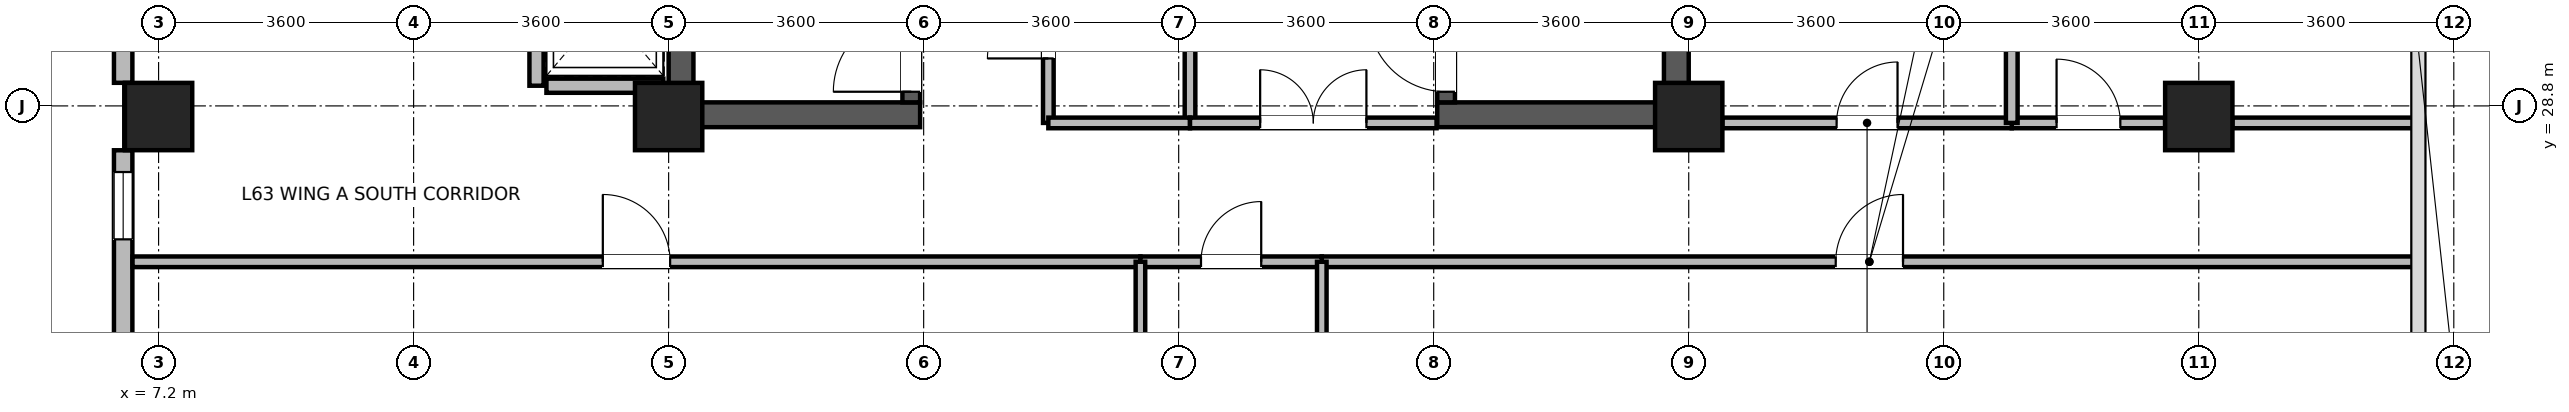
"""IFC4 building model, lengths in metres.
Left out: names, types, materials, properties, quantities, classifications, styles, units other than length and angle.
Written with IfcOpenShell. Run it as: python <this file> out.ifc"""

import sys

from ifc_helpers import new_model, si_unit, direction, frame, frame_2d, origin, origin_2d, place, context, subcontext, project, spatial, rectangle, extrude, source, transform, mapped, element, fill, save


model = new_model("IFC4")
c1 = context("Model", 3, precision=1e-05, world=origin(), true_north=direction((0.0, 1.0)))
c2 = subcontext(c1, "Body", "Model", "MODEL_VIEW")
j1 = project(units=[si_unit("LENGTHUNIT", "METRE"), si_unit("PLANEANGLEUNIT", "RADIAN")], contexts=[c1])
p1 = place(None, origin())
s1 = spatial("IfcSite", under=j1, at=p1, CompositionType="ELEMENT")
p2 = place(p1, origin())
s2 = spatial("IfcBuilding", under=s1, at=p2, CompositionType="ELEMENT")
p3 = place(p2, frame((0.0, 0.0, 246.2)))
s3 = spatial("IfcBuildingStorey", under=s2, at=p3, CompositionType="ELEMENT", Elevation=246.2)
for number, where, z_axis, x_axis in (
    (1, (14.575, 28.5, 0.0), (0.0, 0.0, 1.0), (0.0, 1.0, 0.0)),
    (2, (28.625, 28.5, 0.0), (0.0, 0.0, 1.0), (0.0, 1.0, 0.0)),
):
    element("IfcWall", number, at=place(p3, frame(where, z_axis=z_axis, x_axis=x_axis)), inside=s3, PredefinedType="SHEAR", context=c2, shape_type="SweptSolid", body=[
        extrude(rectangle(XDim=7.7, YDim=0.35, at=frame_2d((3.85, 0.0))), origin(), (0.0, 0.0, 1.0), 3.28),
    ])
for number, where, z_axis, x_axis in (
    (3, (14.75, 28.675, 0.0), (0.0, 0.0, 1.0), (1.0, 0.0, 0.0)),
    (4, (25.25, 28.675, 0.0), (0.0, 0.0, 1.0), (1.0, 0.0, 0.0)),
):
    element("IfcWall", number, at=place(p3, frame(where, z_axis=z_axis, x_axis=x_axis)), inside=s3, PredefinedType="SHEAR", context=c2, shape_type="SweptSolid", body=[
        extrude(rectangle(XDim=3.2, YDim=0.35, at=frame_2d((1.6, 0.0))), origin(), (0.0, 0.0, 1.0), 3.28),
    ])
p4 = place(p3, frame((17.825, 28.85, 0.0), z_axis=(0.0, 0.0, 1.0), x_axis=(0.0, 1.0, 0.0)))
e5 = element("IfcWall", 5, at=p4, inside=s3, PredefinedType="SHEAR", context=c2, shape_type="SweptSolid", body=[
    extrude(rectangle(XDim=7.0, YDim=0.25, at=frame_2d((3.5, 0.0))), origin(), (0.0, 0.0, 1.0), 3.28),
])
p5 = place(p4, frame((0.15, 0.0, 0.0)))
e6 = element("IfcOpeningElement", 6, at=p5, cuts=e5, PredefinedType="OPENING", context=c2, shape_type="SweptSolid", body=[
    extrude(rectangle(XDim=1.1, YDim=2.08, at=frame_2d((0.55, 1.04))), frame((0.0, 0.135, 0.0), z_axis=(0.0, -1.0, 0.0), x_axis=(1.0, 0.0, 0.0)), (0.0, 0.0, 1.0), 0.27),
])
p6 = place(p3, frame((25.375, 28.85, 0.0), z_axis=(0.0, 0.0, 1.0), x_axis=(0.0, 1.0, 0.0)))
e7 = element("IfcWall", 7, at=p6, inside=s3, PredefinedType="SHEAR", context=c2, shape_type="SweptSolid", body=[
    extrude(rectangle(XDim=7.0, YDim=0.25, at=frame_2d((3.5, 0.0))), origin(), (0.0, 0.0, 1.0), 3.28),
])
p7 = place(p6, frame((0.15, 0.0, 0.0)))
e8 = element("IfcOpeningElement", 8, at=p7, cuts=e7, PredefinedType="OPENING", context=c2, shape_type="SweptSolid", body=[
    extrude(rectangle(XDim=1.1, YDim=2.08, at=frame_2d((0.55, 1.04))), frame((0.0, 0.135, 0.0), z_axis=(0.0, -1.0, 0.0), x_axis=(1.0, 0.0, 0.0)), (0.0, 0.0, 1.0), 0.27),
])
m1 = source(origin(), c2, "Body", "SweptSolid", [
    extrude(rectangle(XDim=0.95, YDim=0.95, at=origin_2d()), origin(), (0.0, 0.0, 1.0), 3.7),
])
for number, where, z_axis, x_axis in (
    (9, (7.2, 28.65, 0.0), (0.0, 0.0, 1.0), (1.0, 0.0, 0.0)),
    (10, (14.4, 28.65, 0.0), (0.0, 0.0, 1.0), (1.0, 0.0, 0.0)),
    (11, (28.8, 28.65, 0.0), (0.0, 0.0, 1.0), (1.0, 0.0, 0.0)),
    (12, (36.0, 28.65, 0.0), (0.0, 0.0, 1.0), (1.0, 0.0, 0.0)),
):
    element("IfcColumn", number, at=place(p3, frame(where, z_axis=z_axis, x_axis=x_axis)), inside=s3, PredefinedType="COLUMN", context=c2, shape_type="MappedRepresentation", body=[
        mapped(m1, transform((0.0, 0.0, 0.0), x_axis=(1.0, 0.0, 0.0), y_axis=(0.0, 1.0, 0.0), z_axis=(0.0, 0.0, 1.0), scale=1.0)),
    ])
p8 = place(p3, frame((6.7, 29.126, 0.0), z_axis=(0.0, 0.0, 1.0), x_axis=(0.0, 1.0, 0.0)))
e13 = element("IfcWall", 13, at=p8, inside=s3, PredefinedType="STANDARD", context=c2, shape_type="SweptSolid", body=[
    extrude(rectangle(XDim=6.548, YDim=0.26, at=frame_2d((3.274, 0.0))), origin(), (0.0, 0.0, 1.0), 3.26),
])
p9 = place(p8, frame((1.037, 0.0, 0.85)))
e14 = element("IfcOpeningElement", 14, at=p9, cuts=e13, PredefinedType="OPENING", context=c2, shape_type="SweptSolid", body=[
    extrude(rectangle(XDim=1.2, YDim=1.75, at=frame_2d((0.6, 0.875))), frame((0.0, 0.14, 0.0), z_axis=(0.0, -1.0, 0.0), x_axis=(1.0, 0.0, 0.0)), (0.0, 0.0, 1.0), 0.28),
])
p10 = place(p8, frame((4.311, 0.0, 0.85)))
e15 = element("IfcOpeningElement", 15, at=p10, cuts=e13, PredefinedType="OPENING", context=c2, shape_type="SweptSolid", body=[
    extrude(rectangle(XDim=1.2, YDim=1.75, at=frame_2d((0.6, 0.875))), frame((0.0, 0.14, 0.0), z_axis=(0.0, -1.0, 0.0), x_axis=(1.0, 0.0, 0.0)), (0.0, 0.0, 1.0), 0.28),
])
p11 = place(p3, frame((6.7, 25.07, 0.0), z_axis=(0.0, 0.0, 1.0), x_axis=(0.0, 1.0, 0.0)))
e16 = element("IfcWall", 16, at=p11, inside=s3, PredefinedType="STANDARD", context=c2, shape_type="SweptSolid", body=[
    extrude(rectangle(XDim=3.104, YDim=0.26, at=frame_2d((1.552, 0.0))), origin(), (0.0, 0.0, 1.0), 3.26),
])
p12 = place(p11, frame((1.847, 0.0, 0.85)))
e17 = element("IfcOpeningElement", 17, at=p12, cuts=e16, PredefinedType="OPENING", context=c2, shape_type="SweptSolid", body=[
    extrude(rectangle(XDim=0.95, YDim=1.75, at=frame_2d((0.475, 0.875))), frame((0.0, 0.14, 0.0), z_axis=(0.0, -1.0, 0.0), x_axis=(1.0, 0.0, 0.0)), (0.0, 0.0, 1.0), 0.28),
])
p13 = place(p3, frame((12.675, 29.085, 0.0), z_axis=(0.0, 0.0, 1.0), x_axis=(1.0, 0.0, 0.0)))
e18 = element("IfcWall", 18, at=p13, inside=s3, PredefinedType="PARTITIONING", context=c2, shape_type="SweptSolid", body=[
    extrude(rectangle(XDim=1.65, YDim=0.2, at=frame_2d((0.825, 0.0))), origin(), (0.0, 0.0, 1.0), 1.46),
])
p14 = place(p3, frame((12.535, 29.085, 0.0), z_axis=(0.0, 0.0, 1.0), x_axis=(0.0, 1.0, 0.0)))
e19 = element("IfcWall", 19, at=p14, inside=s3, PredefinedType="PARTITIONING", context=c2, shape_type="SweptSolid", body=[
    extrude(rectangle(XDim=2.23, YDim=0.2, at=frame_2d((1.115, 0.0))), origin(), (0.0, 0.0, 1.0), 3.26),
])
p15 = place(p3, frame((23.62, 26.6, 0.0), z_axis=(0.0, 0.0, 1.0), x_axis=(1.0, 0.0, 0.0)))
e20 = element("IfcWall", 20, at=p15, inside=s3, PredefinedType="PARTITIONING", context=c2, shape_type="SweptSolid", body=[
    extrude(rectangle(XDim=15.46, YDim=0.15, at=frame_2d((7.73, 0.0))), origin(), (0.0, 0.0, 1.0), 3.26),
])
p16 = place(p15, frame((7.255, 0.0, 0.0)))
e21 = element("IfcOpeningElement", 21, at=p16, cuts=e20, PredefinedType="OPENING", context=c2, shape_type="SweptSolid", body=[
    extrude(rectangle(XDim=0.95, YDim=2.1, at=frame_2d((0.475, 1.05))), frame((0.0, 0.085, 0.0), z_axis=(0.0, -1.0, 0.0), x_axis=(1.0, 0.0, 0.0)), (0.0, 0.0, 1.0), 0.17),
])
p17 = place(p3, frame((6.832, 26.6, 0.0), z_axis=(0.0, 0.0, 1.0), x_axis=(1.0, 0.0, 0.0)))
e22 = element("IfcWall", 22, at=p17, inside=s3, PredefinedType="PARTITIONING", context=c2, shape_type="SweptSolid", body=[
    extrude(rectangle(XDim=14.228, YDim=0.15, at=frame_2d((7.114, 0.0))), origin(), (0.0, 0.0, 1.0), 3.26),
])
p18 = place(p17, frame((6.639, 0.0, 0.0)))
e23 = element("IfcOpeningElement", 23, at=p18, cuts=e22, PredefinedType="OPENING", context=c2, shape_type="SweptSolid", body=[
    extrude(rectangle(XDim=0.95, YDim=2.1, at=frame_2d((0.475, 1.05))), frame((0.0, 0.085, 0.0), z_axis=(0.0, -1.0, 0.0), x_axis=(1.0, 0.0, 0.0)), (0.0, 0.0, 1.0), 0.17),
])
p19 = place(p3, frame((33.36, 28.56, 0.0), z_axis=(0.0, 0.0, 1.0), x_axis=(1.0, 0.0, 0.0)))
e24 = element("IfcWall", 24, at=p19, inside=s3, PredefinedType="PARTITIONING", context=c2, shape_type="SweptSolid", body=[
    extrude(rectangle(XDim=2.165, YDim=0.15, at=frame_2d((1.083, 0.0))), origin(), (0.0, 0.0, 1.0), 2.71),
])
p20 = place(p19, frame((0.633, 0.0, 0.0)))
e25 = element("IfcOpeningElement", 25, at=p20, cuts=e24, PredefinedType="OPENING", context=c2, shape_type="SweptSolid", body=[
    extrude(rectangle(XDim=0.9, YDim=2.08, at=frame_2d((0.45, 1.04))), frame((0.0, 0.085, 0.0), z_axis=(0.0, -1.0, 0.0), x_axis=(1.0, 0.0, 0.0)), (0.0, 0.0, 1.0), 0.17),
])
p21 = place(p3, frame((36.475, 28.56, 0.0), z_axis=(0.0, 0.0, 1.0), x_axis=(1.0, 0.0, 0.0)))
e26 = element("IfcWall", 26, at=p21, inside=s3, PredefinedType="PARTITIONING", context=c2, shape_type="SweptSolid", body=[
    extrude(rectangle(XDim=2.605, YDim=0.15, at=frame_2d((1.302, 0.0))), origin(), (0.0, 0.0, 1.0), 2.46),
])
p22 = place(p3, frame((29.275, 28.56, 0.0), z_axis=(0.0, 0.0, 1.0), x_axis=(1.0, 0.0, 0.0)))
e27 = element("IfcWall", 27, at=p22, inside=s3, PredefinedType="PARTITIONING", context=c2, shape_type="SweptSolid", body=[
    extrude(rectangle(XDim=4.085, YDim=0.15, at=frame_2d((2.042, 0.0))), origin(), (0.0, 0.0, 1.0), 2.71),
])
p23 = place(p22, frame((1.613, 0.0, 0.0)))
e28 = element("IfcOpeningElement", 28, at=p23, cuts=e27, PredefinedType="OPENING", context=c2, shape_type="SweptSolid", body=[
    extrude(rectangle(XDim=0.86, YDim=2.02, at=frame_2d((0.43, 1.01))), frame((0.0, 0.085, 0.0), z_axis=(0.0, -1.0, 0.0), x_axis=(1.0, 0.0, 0.0)), (0.0, 0.0, 1.0), 0.17),
])
p24 = place(p3, frame((19.76, 28.56, 0.0), z_axis=(0.0, 0.0, 1.0), x_axis=(0.0, 1.0, 0.0)))
e29 = element("IfcWall", 29, at=p24, inside=s3, PredefinedType="PARTITIONING", context=c2, shape_type="SweptSolid", body=[
    extrude(rectangle(XDim=2.68, YDim=0.15, at=frame_2d((1.34, 0.0))), origin(), (0.0, 0.0, 1.0), 3.26),
])
p25 = place(p24, frame((0.91, 0.0, 0.0)))
e30 = element("IfcOpeningElement", 30, at=p25, cuts=e29, PredefinedType="OPENING", context=c2, shape_type="SweptSolid", body=[
    extrude(rectangle(XDim=0.86, YDim=2.02, at=frame_2d((0.43, 1.01))), frame((0.0, 0.085, 0.0), z_axis=(0.0, -1.0, 0.0), x_axis=(1.0, 0.0, 0.0)), (0.0, 0.0, 1.0), 0.17),
])
p26 = place(p3, frame((21.76, 28.56, 0.0), z_axis=(0.0, 0.0, 1.0), x_axis=(0.0, 1.0, 0.0)))
e31 = element("IfcWall", 31, at=p26, inside=s3, PredefinedType="PARTITIONING", context=c2, shape_type="SweptSolid", body=[
    extrude(rectangle(XDim=2.68, YDim=0.15, at=frame_2d((1.34, 0.0))), origin(), (0.0, 0.0, 1.0), 3.26),
])
p27 = place(p3, frame((21.06, 26.6, 0.0), z_axis=(0.0, 0.0, 1.0), x_axis=(1.0, 0.0, 0.0)))
e32 = element("IfcWall", 32, at=p27, inside=s3, PredefinedType="PARTITIONING", context=c2, shape_type="SweptSolid", body=[
    extrude(rectangle(XDim=2.56, YDim=0.15, at=frame_2d((1.28, 0.0))), origin(), (0.0, 0.0, 1.0), 3.26),
])
p28 = place(p27, frame((0.855, 0.0, 0.0)))
e33 = element("IfcOpeningElement", 33, at=p28, cuts=e32, PredefinedType="OPENING", context=c2, shape_type="SweptSolid", body=[
    extrude(rectangle(XDim=0.85, YDim=2.04, at=frame_2d((0.425, 1.02))), frame((0.0, 0.085, 0.0), z_axis=(0.0, -1.0, 0.0), x_axis=(1.0, 0.0, 0.0)), (0.0, 0.0, 1.0), 0.17),
])
p29 = place(p3, frame((19.76, 28.56, 0.0), z_axis=(0.0, 0.0, 1.0), x_axis=(1.0, 0.0, 0.0)))
e34 = element("IfcWall", 34, at=p29, inside=s3, PredefinedType="PARTITIONING", context=c2, shape_type="SweptSolid", body=[
    extrude(rectangle(XDim=2.0, YDim=0.15, at=frame_2d((1.0, 0.0))), origin(), (0.0, 0.0, 1.0), 2.36),
])
for number, where, z_axis, x_axis in (
    (35, (21.06, 21.732, 0.0), (0.0, 0.0, 1.0), (0.0, 1.0, 0.0)),
    (36, (23.62, 21.732, 0.0), (0.0, 0.0, 1.0), (0.0, 1.0, 0.0)),
):
    element("IfcWall", number, at=place(p3, frame(where, z_axis=z_axis, x_axis=x_axis)), inside=s3, PredefinedType="PARTITIONING", context=c2, shape_type="SweptSolid", body=[
        extrude(rectangle(XDim=4.868, YDim=0.135, at=frame_2d((2.434, 0.0))), origin(), (0.0, 0.0, 1.0), 3.26),
    ])
p30 = place(p3, frame((21.76, 28.56, 0.0), z_axis=(0.0, 0.0, 1.0), x_axis=(1.0, 0.0, 0.0)))
e37 = element("IfcWall", 37, at=p30, inside=s3, PredefinedType="PARTITIONING", context=c2, shape_type="SweptSolid", body=[
    extrude(rectangle(XDim=3.48, YDim=0.15, at=frame_2d((1.74, 0.0))), origin(), (0.0, 0.0, 1.0), 2.36),
])
p31 = place(p30, frame((0.99, 0.0, 0.0)))
e38 = element("IfcOpeningElement", 38, at=p31, cuts=e37, PredefinedType="OPENING", context=c2, shape_type="SweptSolid", body=[
    extrude(rectangle(XDim=1.5, YDim=2.1, at=frame_2d((0.75, 1.05))), frame((0.0, 0.085, 0.0), z_axis=(0.0, -1.0, 0.0), x_axis=(1.0, 0.0, 0.0)), (0.0, 0.0, 1.0), 0.17),
])
p32 = place(p3, frame((33.36, 28.56, 0.0), z_axis=(0.0, 0.0, 1.0), x_axis=(0.0, 1.0, 0.0)))
e39 = element("IfcWall", 39, at=p32, inside=s3, PredefinedType="PARTITIONING", context=c2, shape_type="SweptSolid", body=[
    extrude(rectangle(XDim=3.08, YDim=0.165, at=frame_2d((1.54, 0.0))), origin(), (0.0, 0.0, 1.0), 3.26),
])
p33 = place(p12, origin())
e40 = element("IfcWindow", 40, at=p33, inside=s3, PartitioningType="SINGLE_PANEL", PredefinedType="WINDOW", context=c2, shape_type="SweptSolid", body=[
    extrude(rectangle(XDim=0.95, YDim=1.75, at=frame_2d((0.475, 0.875))), frame((0.0, 0.03, 0.0), z_axis=(0.0, -1.0, 0.0), x_axis=(1.0, 0.0, 0.0)), (0.0, 0.0, 1.0), 0.06),
])
fill(e17, e40)
p34 = place(p5, origin())
e41 = element("IfcDoor", 41, at=p34, inside=s3, OperationType="SINGLE_SWING_LEFT", PredefinedType="DOOR", context=c2, shape_type="SweptSolid", body=[
    extrude(rectangle(XDim=1.1, YDim=2.08, at=frame_2d((0.55, 1.04))), frame((0.0, 0.025, 0.0), z_axis=(0.0, -1.0, 0.0), x_axis=(1.0, 0.0, 0.0)), (0.0, 0.0, 1.0), 0.05),
])
fill(e6, e41)
p35 = place(p7, origin())
e42 = element("IfcDoor", 42, at=p35, inside=s3, OperationType="SINGLE_SWING_RIGHT", PredefinedType="DOOR", context=c2, shape_type="SweptSolid", body=[
    extrude(rectangle(XDim=1.1, YDim=2.08, at=frame_2d((0.55, 1.04))), frame((0.0, 0.025, 0.0), z_axis=(0.0, -1.0, 0.0), x_axis=(1.0, 0.0, 0.0)), (0.0, 0.0, 1.0), 0.05),
])
fill(e8, e42)
p36 = place(p16, origin())
e43 = element("IfcDoor", 43, at=p36, inside=s3, OperationType="SINGLE_SWING_RIGHT", PredefinedType="DOOR", context=c2, shape_type="SweptSolid", body=[
    extrude(rectangle(XDim=0.95, YDim=2.1, at=frame_2d((0.475, 1.05))), frame((0.0, 0.025, 0.0), z_axis=(0.0, -1.0, 0.0), x_axis=(1.0, 0.0, 0.0)), (0.0, 0.0, 1.0), 0.05),
])
fill(e21, e43)
p37 = place(p18, origin())
e44 = element("IfcDoor", 44, at=p37, inside=s3, OperationType="SINGLE_SWING_LEFT", PredefinedType="DOOR", context=c2, shape_type="SweptSolid", body=[
    extrude(rectangle(XDim=0.95, YDim=2.1, at=frame_2d((0.475, 1.05))), frame((0.0, 0.025, 0.0), z_axis=(0.0, -1.0, 0.0), x_axis=(1.0, 0.0, 0.0)), (0.0, 0.0, 1.0), 0.05),
])
fill(e23, e44)
p38 = place(p20, origin())
e45 = element("IfcDoor", 45, at=p38, inside=s3, OperationType="SINGLE_SWING_LEFT", PredefinedType="DOOR", context=c2, shape_type="SweptSolid", body=[
    extrude(rectangle(XDim=0.9, YDim=2.08, at=frame_2d((0.45, 1.04))), frame((0.0, 0.025, 0.0), z_axis=(0.0, -1.0, 0.0), x_axis=(1.0, 0.0, 0.0)), (0.0, 0.0, 1.0), 0.05),
])
fill(e25, e45)
p39 = place(p23, origin())
e46 = element("IfcDoor", 46, at=p39, inside=s3, OperationType="SINGLE_SWING_RIGHT", PredefinedType="DOOR", context=c2, shape_type="SweptSolid", body=[
    extrude(rectangle(XDim=0.86, YDim=2.02, at=frame_2d((0.43, 1.01))), frame((0.0, 0.025, 0.0), z_axis=(0.0, -1.0, 0.0), x_axis=(1.0, 0.0, 0.0)), (0.0, 0.0, 1.0), 0.05),
])
fill(e28, e46)
p40 = place(p25, origin())
e47 = element("IfcDoor", 47, at=p40, inside=s3, OperationType="SINGLE_SWING_LEFT", PredefinedType="DOOR", context=c2, shape_type="SweptSolid", body=[
    extrude(rectangle(XDim=0.86, YDim=2.02, at=frame_2d((0.43, 1.01))), frame((0.0, 0.025, 0.0), z_axis=(0.0, -1.0, 0.0), x_axis=(1.0, 0.0, 0.0)), (0.0, 0.0, 1.0), 0.05),
])
fill(e30, e47)
p41 = place(p28, origin())
e48 = element("IfcDoor", 48, at=p41, inside=s3, OperationType="SINGLE_SWING_RIGHT", PredefinedType="DOOR", context=c2, shape_type="SweptSolid", body=[
    extrude(rectangle(XDim=0.85, YDim=2.04, at=frame_2d((0.425, 1.02))), frame((0.0, 0.025, 0.0), z_axis=(0.0, -1.0, 0.0), x_axis=(1.0, 0.0, 0.0)), (0.0, 0.0, 1.0), 0.05),
])
fill(e33, e48)
p42 = place(p31, origin())
e49 = element("IfcDoor", 49, at=p42, inside=s3, OperationType="DOUBLE_DOOR_SINGLE_SWING", PredefinedType="DOOR", context=c2, shape_type="SweptSolid", body=[
    extrude(rectangle(XDim=1.5, YDim=2.1, at=frame_2d((0.75, 1.05))), frame((0.0, 0.025, 0.0), z_axis=(0.0, -1.0, 0.0), x_axis=(1.0, 0.0, 0.0)), (0.0, 0.0, 1.0), 0.05),
])
fill(e38, e49)
save(model, sys.argv[1])
